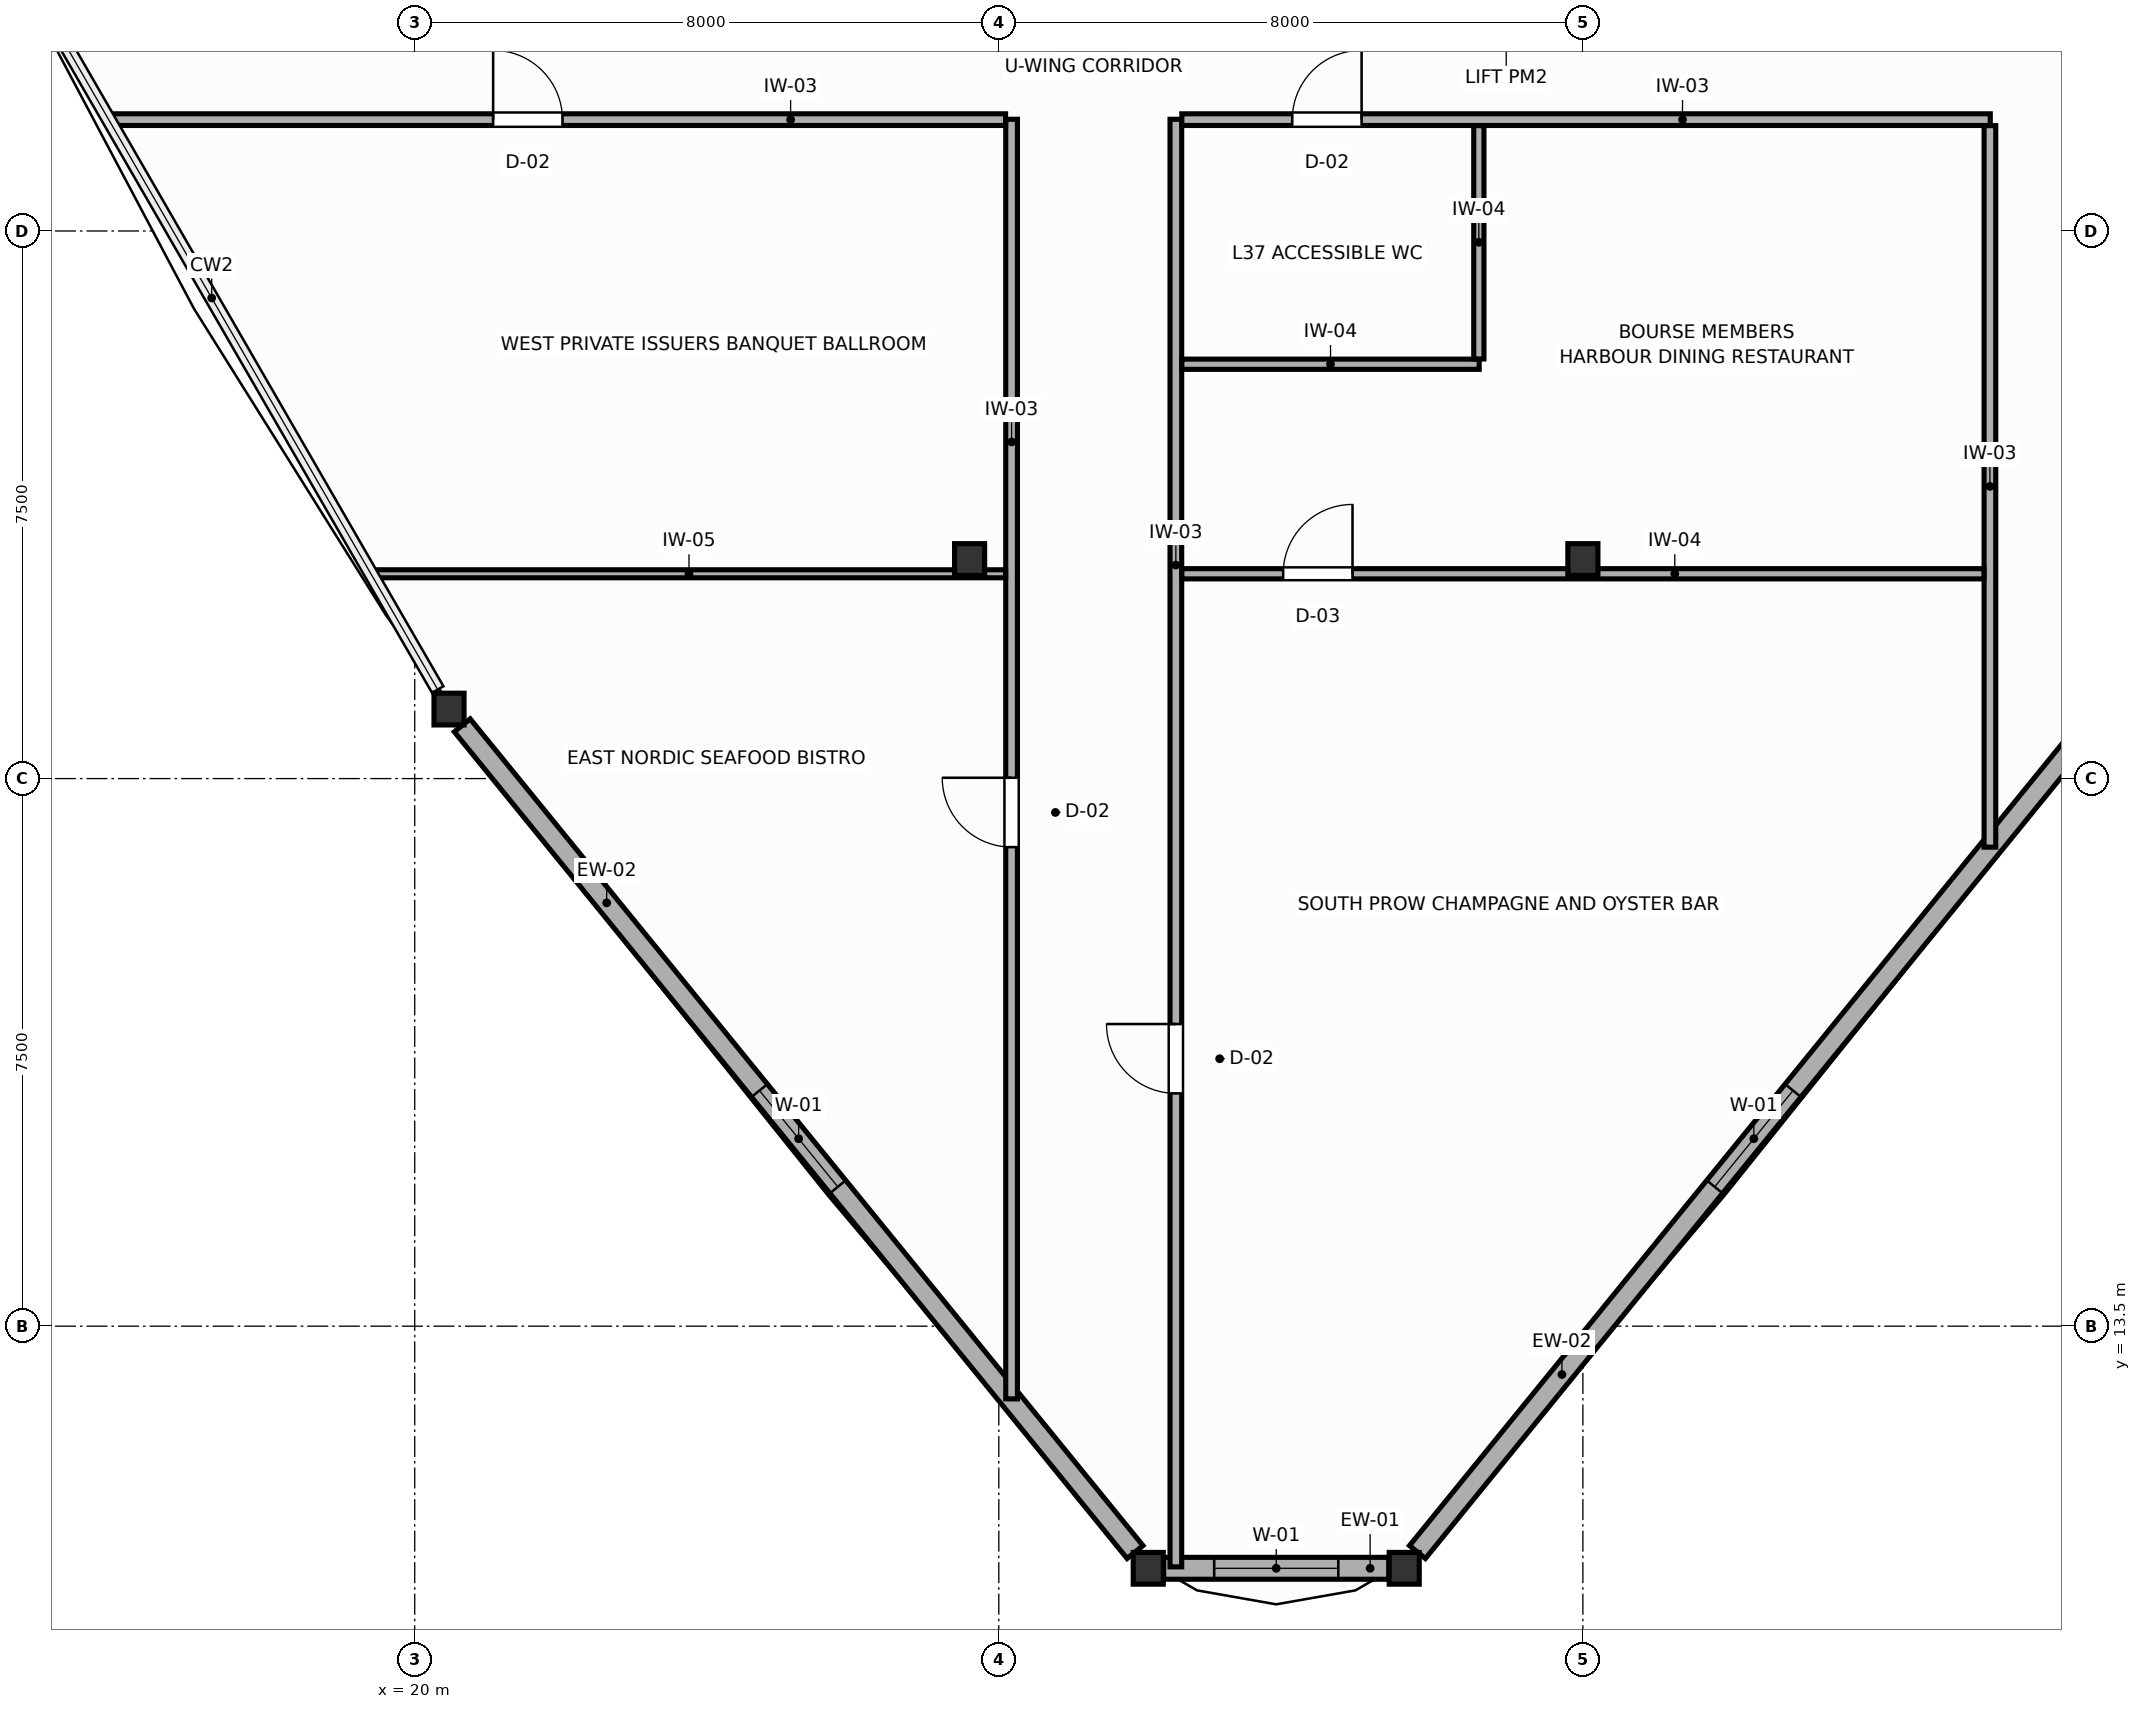
"""IFC4 building model, lengths in metres.
Left out: names, types, materials, properties, quantities, classifications, styles, units other than length and angle.
Written with IfcOpenShell. Run it as: python <this file> out.ifc"""

import sys

from ifc_helpers import new_model, si_unit, direction, frame, frame_2d, origin, origin_2d, place, context, subcontext, project, spatial, rectangle, i_section, extrude, source, transform, mapped, element, fill, save


model = new_model("IFC4")
c1 = context("Model", 3, precision=1e-05, world=origin(), true_north=direction((0.0, 1.0)))
c2 = subcontext(c1, "Body", "Model", "MODEL_VIEW")
j1 = project(units=[si_unit("LENGTHUNIT", "METRE"), si_unit("PLANEANGLEUNIT", "RADIAN")], contexts=[c1])
p1 = place(None, origin())
s1 = spatial("IfcSite", under=j1, at=p1, CompositionType="ELEMENT")
p2 = place(p1, origin())
s2 = spatial("IfcBuilding", under=s1, at=p2, CompositionType="ELEMENT")
p3 = place(p2, frame((0.0, 0.0, 147.0)))
s3 = spatial("IfcBuildingStorey", under=s2, at=p3, CompositionType="ELEMENT", Elevation=147.0)
m1 = source(origin(), c2, "Body", "SweptSolid", [
    extrude(i_section(OverallWidth=0.412, OverallDepth=0.435, WebThickness=0.033, FlangeThickness=0.053, FilletRadius=0.015, at=origin_2d()), origin(), (0.0, 0.0, 1.0), 3.6),
])
for number, where, z_axis, x_axis in (
    (1, (27.6, 24.0, 0.0), (0.0, 0.0, 1.0), (1.0, 0.0, 0.0)),
    (2, (36.0, 24.0, 0.0), (0.0, 0.0, 1.0), (1.0, 0.0, 0.0)),
    (3, (20.469, 21.952, 0.0), (0.0, 0.0, 1.0), (1.0, 0.0, 0.0)),
    (4, (30.047, 10.184, 0.0), (0.0, 0.0, 1.0), (1.0, 0.0, 0.0)),
    (5, (33.553, 10.184, 0.0), (0.0, 0.0, 1.0), (1.0, 0.0, 0.0)),
):
    element("IfcColumn", number, at=place(p3, frame(where, z_axis=z_axis, x_axis=x_axis)), inside=s3, PredefinedType="COLUMN", context=c2, shape_type="MappedRepresentation", body=[
        mapped(m1, transform((0.0, 0.0, 0.0), scale=1.0)),
    ])
p4 = place(p3, frame((20.651, 21.729, 0.0), z_axis=(0.0, 0.0, 1.0), x_axis=(0.631219465915, -0.775604271423, 0.0)))
e6 = element("IfcWall", 6, at=p4, inside=s3, PredefinedType="SOLIDWALL", context=c2, shape_type="SweptSolid", body=[
    extrude(rectangle(XDim=14.599, YDim=0.28, at=frame_2d((7.3, 0.0))), origin(), (0.0, 0.0, 1.0), 3.0),
])
p5 = place(p4, frame((6.45, 0.0, 0.75)))
e7 = element("IfcOpeningElement", 7, at=p5, cuts=e6, PredefinedType="OPENING", context=c2, shape_type="SweptSolid", body=[
    extrude(rectangle(XDim=1.7, YDim=1.75, at=frame_2d((0.85, 0.875))), frame((0.0, 0.15, 0.0), z_axis=(0.0, -1.0, 0.0), x_axis=(1.0, 0.0, 0.0)), (0.0, 0.0, 1.0), 0.3),
])
p6 = place(p3, frame((30.258, 10.184, 0.0), z_axis=(0.0, 0.0, 1.0), x_axis=(1.0, 0.0, 0.0)))
e8 = element("IfcWall", 8, at=p6, inside=s3, PredefinedType="SOLIDWALL", context=c2, shape_type="SweptSolid", body=[
    extrude(rectangle(XDim=3.084, YDim=0.3, at=frame_2d((1.542, 0.0))), origin(), (0.0, 0.0, 1.0), 3.0),
])
p7 = place(p6, frame((0.692, 0.0, 0.75)))
e9 = element("IfcOpeningElement", 9, at=p7, cuts=e8, PredefinedType="OPENING", context=c2, shape_type="SweptSolid", body=[
    extrude(rectangle(XDim=1.7, YDim=1.75, at=frame_2d((0.85, 0.875))), frame((0.0, 0.16, 0.0), z_axis=(0.0, -1.0, 0.0), x_axis=(1.0, 0.0, 0.0)), (0.0, 0.0, 1.0), 0.32),
])
p8 = place(p3, frame((33.734, 10.406, 0.0), z_axis=(0.0, 0.0, 1.0), x_axis=(0.631219465915, 0.775604271423, 0.0)))
e10 = element("IfcWall", 10, at=p8, inside=s3, PredefinedType="SOLIDWALL", context=c2, shape_type="SweptSolid", body=[
    extrude(rectangle(XDim=14.599, YDim=0.28, at=frame_2d((7.3, 0.0))), origin(), (0.0, 0.0, 1.0), 3.0),
])
p9 = place(p8, frame((6.45, 0.0, 0.75)))
e11 = element("IfcOpeningElement", 11, at=p9, cuts=e10, PredefinedType="OPENING", context=c2, shape_type="SweptSolid", body=[
    extrude(rectangle(XDim=1.7, YDim=1.75, at=frame_2d((0.85, 0.875))), frame((0.0, 0.15, 0.0), z_axis=(0.0, -1.0, 0.0), x_axis=(1.0, 0.0, 0.0)), (0.0, 0.0, 1.0), 0.3),
])
p10 = place(p3, frame((30.425, 10.204, 0.0), z_axis=(0.0, 0.0, 1.0), x_axis=(0.0, 1.0, 0.0)))
e12 = element("IfcWall", 12, at=p10, inside=s3, PredefinedType="PARTITIONING", context=c2, shape_type="SweptSolid", body=[
    extrude(rectangle(XDim=19.826, YDim=0.16, at=frame_2d((9.913, 0.0))), origin(), (0.0, 0.0, 1.0), 3.4),
])
p11 = place(p10, frame((6.484, 0.0, 0.0)))
e13 = element("IfcOpeningElement", 13, at=p11, cuts=e12, PredefinedType="OPENING", context=c2, shape_type="SweptSolid", body=[
    extrude(rectangle(XDim=0.95, YDim=2.05, at=frame_2d((0.475, 1.025))), frame((0.0, 0.09, 0.0), z_axis=(0.0, -1.0, 0.0), x_axis=(1.0, 0.0, 0.0)), (0.0, 0.0, 1.0), 0.18),
])
p12 = place(p3, frame((28.175, 12.504, 0.0), z_axis=(0.0, 0.0, 1.0), x_axis=(0.0, 1.0, 0.0)))
e14 = element("IfcWall", 14, at=p12, inside=s3, PredefinedType="PARTITIONING", context=c2, shape_type="SweptSolid", body=[
    extrude(rectangle(XDim=17.526, YDim=0.16, at=frame_2d((8.763, 0.0))), origin(), (0.0, 0.0, 1.0), 2.95),
])
p13 = place(p12, frame((7.557, 0.0, 0.0)))
e15 = element("IfcOpeningElement", 15, at=p13, cuts=e14, PredefinedType="OPENING", context=c2, shape_type="SweptSolid", body=[
    extrude(rectangle(XDim=0.95, YDim=2.05, at=frame_2d((0.475, 1.025))), frame((0.0, 0.09, 0.0), z_axis=(0.0, -1.0, 0.0), x_axis=(1.0, 0.0, 0.0)), (0.0, 0.0, 1.0), 0.18),
])
p14 = place(p3, frame((15.829, 30.025, 0.0), z_axis=(0.0, 0.0, 1.0), x_axis=(1.0, 0.0, 0.0)))
e16 = element("IfcWall", 16, at=p14, inside=s3, PredefinedType="PARTITIONING", context=c2, shape_type="SweptSolid", body=[
    extrude(rectangle(XDim=12.264, YDim=0.16, at=frame_2d((6.132, 0.0))), origin(), (0.0, 0.0, 1.0), 3.4),
])
p15 = place(p14, frame((5.245, 0.0, 0.0)))
e17 = element("IfcOpeningElement", 17, at=p15, cuts=e16, PredefinedType="OPENING", context=c2, shape_type="SweptSolid", body=[
    extrude(rectangle(XDim=0.95, YDim=2.05, at=frame_2d((0.475, 1.025))), frame((0.0, 0.09, 0.0), z_axis=(0.0, -1.0, 0.0), x_axis=(1.0, 0.0, 0.0)), (0.0, 0.0, 1.0), 0.18),
])
p16 = place(p3, frame((30.507, 30.025, 0.0), z_axis=(0.0, 0.0, 1.0), x_axis=(1.0, 0.0, 0.0)))
e18 = element("IfcWall", 18, at=p16, inside=s3, PredefinedType="PARTITIONING", context=c2, shape_type="SweptSolid", body=[
    extrude(rectangle(XDim=11.073, YDim=0.16, at=frame_2d((5.537, 0.0))), origin(), (0.0, 0.0, 1.0), 3.4),
])
p17 = place(p16, frame((1.512, 0.0, 0.0)))
e19 = element("IfcOpeningElement", 19, at=p17, cuts=e18, PredefinedType="OPENING", context=c2, shape_type="SweptSolid", body=[
    extrude(rectangle(XDim=0.95, YDim=2.05, at=frame_2d((0.475, 1.025))), frame((0.0, 0.09, 0.0), z_axis=(0.0, -1.0, 0.0), x_axis=(1.0, 0.0, 0.0)), (0.0, 0.0, 1.0), 0.18),
])
p18 = place(p3, frame((41.575, 20.061, 0.0), z_axis=(0.0, 0.0, 1.0), x_axis=(0.0, 1.0, 0.0)))
e20 = element("IfcWall", 20, at=p18, inside=s3, PredefinedType="PARTITIONING", context=c2, shape_type="SweptSolid", body=[
    extrude(rectangle(XDim=9.882, YDim=0.16, at=frame_2d((4.941, 0.0))), origin(), (0.0, 0.0, 1.0), 3.4),
])
p19 = place(p3, frame((30.507, 23.805, 0.0), z_axis=(0.0, 0.0, 1.0), x_axis=(1.0, 0.0, 0.0)))
e21 = element("IfcWall", 21, at=p19, inside=s3, PredefinedType="PARTITIONING", context=c2, shape_type="SweptSolid", body=[
    extrude(rectangle(XDim=10.986, YDim=0.14, at=frame_2d((5.493, 0.0))), origin(), (0.0, 0.0, 1.0), 2.95),
])
p20 = place(p19, frame((1.388, 0.0, 0.0)))
e22 = element("IfcOpeningElement", 22, at=p20, cuts=e21, PredefinedType="OPENING", context=c2, shape_type="SweptSolid", body=[
    extrude(rectangle(XDim=0.95, YDim=2.05, at=frame_2d((0.475, 1.025))), frame((0.0, 0.08, 0.0), z_axis=(0.0, -1.0, 0.0), x_axis=(1.0, 0.0, 0.0)), (0.0, 0.0, 1.0), 0.16),
])
p21 = place(p3, frame((19.42, 23.805, 0.0), z_axis=(0.0, 0.0, 1.0), x_axis=(1.0, 0.0, 0.0)))
e23 = element("IfcWall", 23, at=p21, inside=s3, PredefinedType="MOVABLE", context=c2, shape_type="SweptSolid", body=[
    extrude(rectangle(XDim=8.673, YDim=0.11, at=frame_2d((4.337, 0.0))), origin(), (0.0, 0.0, 1.0), 2.95),
])
p22 = place(p3, frame((30.507, 26.675, 0.0), z_axis=(0.0, 0.0, 1.0), x_axis=(1.0, 0.0, 0.0)))
e24 = element("IfcWall", 24, at=p22, inside=s3, PredefinedType="PARTITIONING", context=c2, shape_type="SweptSolid", body=[
    extrude(rectangle(XDim=4.073, YDim=0.14, at=frame_2d((2.037, 0.0))), origin(), (0.0, 0.0, 1.0), 3.4),
])
p23 = place(p3, frame((34.575, 26.747, 0.0), z_axis=(0.0, 0.0, 1.0), x_axis=(0.0, 1.0, 0.0)))
e25 = element("IfcWall", 25, at=p23, inside=s3, PredefinedType="PARTITIONING", context=c2, shape_type="SweptSolid", body=[
    extrude(rectangle(XDim=3.196, YDim=0.14, at=frame_2d((1.598, 0.0))), origin(), (0.0, 0.0, 1.0), 3.4),
])
p24 = place(p5, origin())
e26 = element("IfcWindow", 26, at=p24, inside=s3, PartitioningType="SINGLE_PANEL", PredefinedType="WINDOW", context=c2, shape_type="SweptSolid", body=[
    extrude(rectangle(XDim=1.7, YDim=1.75, at=frame_2d((0.85, 0.875))), frame((0.0, 0.03, 0.0), z_axis=(0.0, -1.0, 0.0), x_axis=(1.0, 0.0, 0.0)), (0.0, 0.0, 1.0), 0.06),
])
fill(e7, e26)
p25 = place(p7, origin())
e27 = element("IfcWindow", 27, at=p25, inside=s3, PartitioningType="SINGLE_PANEL", PredefinedType="WINDOW", context=c2, shape_type="SweptSolid", body=[
    extrude(rectangle(XDim=1.7, YDim=1.75, at=frame_2d((0.85, 0.875))), frame((0.0, 0.03, 0.0), z_axis=(0.0, -1.0, 0.0), x_axis=(1.0, 0.0, 0.0)), (0.0, 0.0, 1.0), 0.06),
])
fill(e9, e27)
p26 = place(p9, origin())
e28 = element("IfcWindow", 28, at=p26, inside=s3, PartitioningType="SINGLE_PANEL", PredefinedType="WINDOW", context=c2, shape_type="SweptSolid", body=[
    extrude(rectangle(XDim=1.7, YDim=1.75, at=frame_2d((0.85, 0.875))), frame((0.0, 0.03, 0.0), z_axis=(0.0, -1.0, 0.0), x_axis=(1.0, 0.0, 0.0)), (0.0, 0.0, 1.0), 0.06),
])
fill(e11, e28)
p27 = place(p11, origin())
e29 = element("IfcDoor", 29, at=p27, inside=s3, OperationType="SINGLE_SWING_RIGHT", PredefinedType="DOOR", context=c2, shape_type="SweptSolid", body=[
    extrude(rectangle(XDim=0.95, YDim=2.05, at=frame_2d((0.475, 1.025))), frame((0.0, 0.025, 0.0), z_axis=(0.0, -1.0, 0.0), x_axis=(1.0, 0.0, 0.0)), (0.0, 0.0, 1.0), 0.05),
])
fill(e13, e29)
p28 = place(p13, origin())
e30 = element("IfcDoor", 30, at=p28, inside=s3, OperationType="SINGLE_SWING_RIGHT", PredefinedType="DOOR", context=c2, shape_type="SweptSolid", body=[
    extrude(rectangle(XDim=0.95, YDim=2.05, at=frame_2d((0.475, 1.025))), frame((0.0, 0.025, 0.0), z_axis=(0.0, -1.0, 0.0), x_axis=(1.0, 0.0, 0.0)), (0.0, 0.0, 1.0), 0.05),
])
fill(e15, e30)
p29 = place(p15, origin())
e31 = element("IfcDoor", 31, at=p29, inside=s3, OperationType="SINGLE_SWING_LEFT", PredefinedType="DOOR", context=c2, shape_type="SweptSolid", body=[
    extrude(rectangle(XDim=0.95, YDim=2.05, at=frame_2d((0.475, 1.025))), frame((0.0, 0.025, 0.0), z_axis=(0.0, -1.0, 0.0), x_axis=(1.0, 0.0, 0.0)), (0.0, 0.0, 1.0), 0.05),
])
fill(e17, e31)
p30 = place(p17, origin())
e32 = element("IfcDoor", 32, at=p30, inside=s3, OperationType="SINGLE_SWING_RIGHT", PredefinedType="DOOR", context=c2, shape_type="SweptSolid", body=[
    extrude(rectangle(XDim=0.95, YDim=2.05, at=frame_2d((0.475, 1.025))), frame((0.0, 0.025, 0.0), z_axis=(0.0, -1.0, 0.0), x_axis=(1.0, 0.0, 0.0)), (0.0, 0.0, 1.0), 0.05),
])
fill(e19, e32)
p31 = place(p20, origin())
e33 = element("IfcDoor", 33, at=p31, inside=s3, OperationType="SINGLE_SWING_RIGHT", PredefinedType="DOOR", context=c2, shape_type="SweptSolid", body=[
    extrude(rectangle(XDim=0.95, YDim=2.05, at=frame_2d((0.475, 1.025))), frame((0.0, 0.025, 0.0), z_axis=(0.0, -1.0, 0.0), x_axis=(1.0, 0.0, 0.0)), (0.0, 0.0, 1.0), 0.05),
])
fill(e22, e33)
save(model, sys.argv[1])
